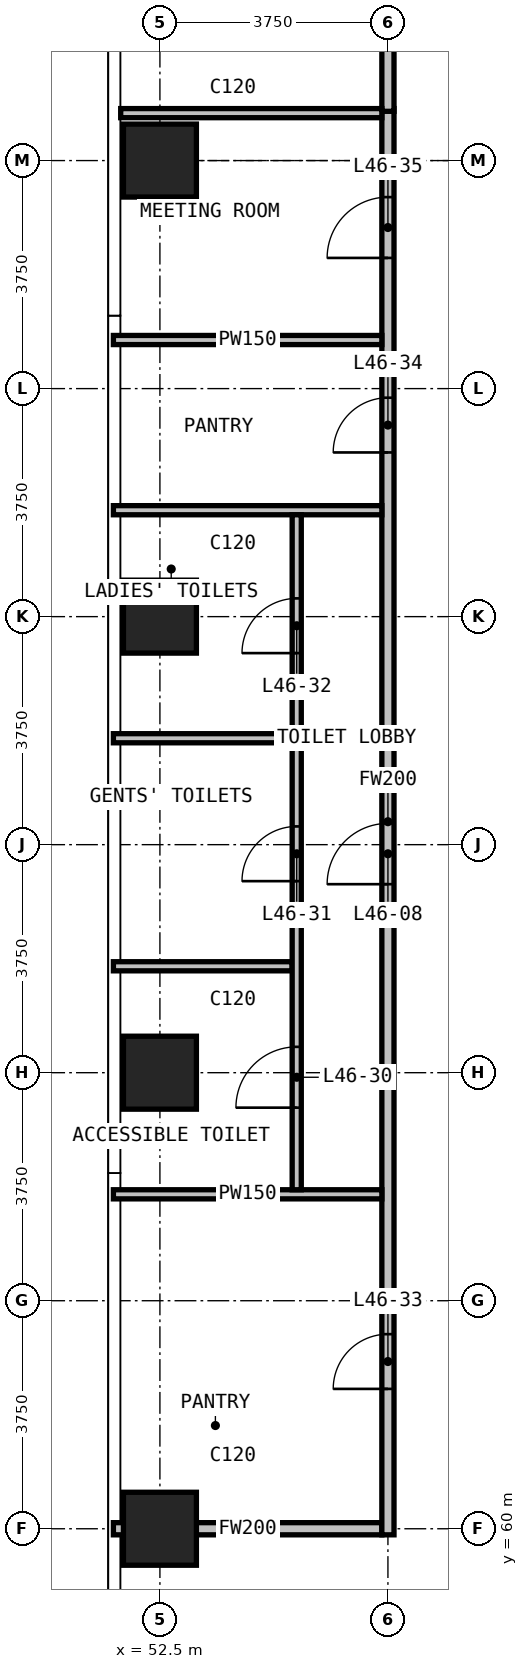
"""IFC4 building model, lengths in metres.
Left out: names, types, materials, properties, quantities, classifications, styles, units other than length and angle.
Written with IfcOpenShell. Run it as: python <this file> out.ifc"""

import sys

from ifc_helpers import new_model, si_unit, direction, frame, frame_2d, origin, origin_2d, place, context, subcontext, project, spatial, rectangle, extrude, element, fill, save


model = new_model("IFC4")
c1 = context("Model", 3, precision=1e-05, world=origin(), true_north=direction((0.0, 1.0)))
c2 = subcontext(c1, "Body", "Model", "MODEL_VIEW")
j1 = project(units=[si_unit("LENGTHUNIT", "METRE"), si_unit("PLANEANGLEUNIT", "RADIAN")], contexts=[c1])
p1 = place(None, origin())
s1 = spatial("IfcSite", under=j1, at=p1, CompositionType="ELEMENT")
p2 = place(p1, origin())
s2 = spatial("IfcBuilding", under=s1, at=p2, CompositionType="ELEMENT")
p3 = place(p2, frame((0.0, 0.0, 180.1)))
s3 = spatial("IfcBuildingStorey", under=s2, at=p3, CompositionType="ELEMENT", Elevation=180.1)
for number, where, z_axis, x_axis in (
    (1, (52.5, 60.0, 0.0), (0.0, 0.0, 1.0), (1.0, 0.0, 0.0)),
    (2, (52.5, 67.5, 0.0), (0.0, 0.0, 1.0), (1.0, 0.0, 0.0)),
    (3, (52.5, 75.0, 0.0), (0.0, 0.0, 1.0), (1.0, 0.0, 0.0)),
    (4, (52.5, 82.5, 0.0), (0.0, 0.0, 1.0), (1.0, 0.0, 0.0)),
):
    element("IfcColumn", number, at=place(p3, frame(where, z_axis=z_axis, x_axis=x_axis)), inside=s3, PredefinedType="COLUMN", context=c2, shape_type="SweptSolid", body=[
        extrude(rectangle(XDim=1.2, YDim=1.2, at=origin_2d()), origin(), (0.0, 0.0, 1.0), 3.6),
    ])
p4 = place(p3, frame((51.735, 60.0, 0.0), z_axis=(0.0, 0.0, 1.0), x_axis=(1.0, 0.0, 0.0)))
e5 = element("IfcWall", 5, at=p4, inside=s3, PredefinedType="PARTITIONING", context=c2, shape_type="SweptSolid", body=[
    extrude(rectangle(XDim=4.415, YDim=0.2, at=frame_2d((2.208, 0.0))), origin(), (0.0, 0.0, 1.0), 3.25),
])
p5 = place(p3, frame((56.25, 59.9, 0.0), z_axis=(0.0, 0.0, 1.0), x_axis=(0.0, 1.0, 0.0)))
e6 = element("IfcWall", 6, at=p5, inside=s3, PredefinedType="PARTITIONING", context=c2, shape_type="SweptSolid", body=[
    extrude(rectangle(XDim=23.455, YDim=0.2, at=frame_2d((11.728, 0.0))), origin(), (0.0, 0.0, 1.0), 3.25),
])
p6 = place(p5, frame((10.7, 0.0, 0.0)))
e7 = element("IfcOpeningElement", 7, at=p6, cuts=e6, PredefinedType="OPENING", context=c2, shape_type="SweptSolid", body=[
    extrude(rectangle(XDim=1.0, YDim=2.2, at=frame_2d((0.5, 1.1))), frame((0.0, 0.11, 0.0), z_axis=(0.0, -1.0, 0.0), x_axis=(1.0, 0.0, 0.0)), (0.0, 0.0, 1.0), 0.22),
])
p7 = place(p5, frame((2.4, 0.0, 0.0)))
e8 = element("IfcOpeningElement", 8, at=p7, cuts=e6, PredefinedType="OPENING", context=c2, shape_type="SweptSolid", body=[
    extrude(rectangle(XDim=0.9, YDim=2.2, at=frame_2d((0.45, 1.1))), frame((0.0, 0.11, 0.0), z_axis=(0.0, -1.0, 0.0), x_axis=(1.0, 0.0, 0.0)), (0.0, 0.0, 1.0), 0.22),
])
p8 = place(p5, frame((17.8, 0.0, 0.0)))
e9 = element("IfcOpeningElement", 9, at=p8, cuts=e6, PredefinedType="OPENING", context=c2, shape_type="SweptSolid", body=[
    extrude(rectangle(XDim=0.9, YDim=2.2, at=frame_2d((0.45, 1.1))), frame((0.0, 0.11, 0.0), z_axis=(0.0, -1.0, 0.0), x_axis=(1.0, 0.0, 0.0)), (0.0, 0.0, 1.0), 0.22),
])
p9 = place(p5, frame((20.999, 0.0, 0.0)))
e10 = element("IfcOpeningElement", 10, at=p9, cuts=e6, PredefinedType="OPENING", context=c2, shape_type="SweptSolid", body=[
    extrude(rectangle(XDim=1.0, YDim=2.2, at=frame_2d((0.5, 1.1))), frame((0.0, 0.11, 0.0), z_axis=(0.0, -1.0, 0.0), x_axis=(1.0, 0.0, 0.0)), (0.0, 0.0, 1.0), 0.22),
])
p10 = place(p3, frame((56.25, 83.31, 0.0), z_axis=(0.0, 0.0, 1.0), x_axis=(0.0, 1.0, 0.0)))
e11 = element("IfcWall", 11, at=p10, inside=s3, PredefinedType="PARTITIONING", context=c2, shape_type="SweptSolid", body=[
    extrude(rectangle(XDim=7.335, YDim=0.2, at=frame_2d((3.667, 0.0))), origin(), (0.0, 0.0, 1.0), 3.25),
])
p11 = place(p3, frame((51.735, 65.5, 0.0), z_axis=(0.0, 0.0, 1.0), x_axis=(1.0, 0.0, 0.0)))
e12 = element("IfcWall", 12, at=p11, inside=s3, PredefinedType="PARTITIONING", context=c2, shape_type="SweptSolid", body=[
    extrude(rectangle(XDim=4.415, YDim=0.15, at=frame_2d((2.208, 0.0))), origin(), (0.0, 0.0, 1.0), 3.25),
])
for number, where, z_axis, x_axis in (
    (13, (51.735, 69.25, 0.0), (0.0, 0.0, 1.0), (1.0, 0.0, 0.0)),
    (14, (51.735, 73.0, 0.0), (0.0, 0.0, 1.0), (1.0, 0.0, 0.0)),
):
    element("IfcWall", number, at=place(p3, frame(where, z_axis=z_axis, x_axis=x_axis)), inside=s3, PredefinedType="PARTITIONING", context=c2, shape_type="SweptSolid", body=[
        extrude(rectangle(XDim=2.94, YDim=0.15, at=frame_2d((1.47, 0.0))), origin(), (0.0, 0.0, 1.0), 3.25),
    ])
for number, where, z_axis, x_axis in (
    (15, (51.735, 76.75, 0.0), (0.0, 0.0, 1.0), (1.0, 0.0, 0.0)),
    (16, (51.735, 79.549, 0.0), (0.0, 0.0, 1.0), (1.0, 0.0, 0.0)),
):
    element("IfcWall", number, at=place(p3, frame(where, z_axis=z_axis, x_axis=x_axis)), inside=s3, PredefinedType="PARTITIONING", context=c2, shape_type="SweptSolid", body=[
        extrude(rectangle(XDim=4.415, YDim=0.15, at=frame_2d((2.208, 0.0))), origin(), (0.0, 0.0, 1.0), 3.25),
    ])
p12 = place(p3, frame((51.855, 83.28, 0.0), z_axis=(0.0, 0.0, 1.0), x_axis=(1.0, 0.0, 0.0)))
e17 = element("IfcWall", 17, at=p12, inside=s3, PredefinedType="PARTITIONING", context=c2, shape_type="SweptSolid", body=[
    extrude(rectangle(XDim=4.295, YDim=0.15, at=frame_2d((2.147, 0.0))), origin(), (0.0, 0.0, 1.0), 3.25),
])
p13 = place(p3, frame((54.75, 65.575, 0.0), z_axis=(0.0, 0.0, 1.0), x_axis=(0.0, 1.0, 0.0)))
e18 = element("IfcWall", 18, at=p13, inside=s3, PredefinedType="PARTITIONING", context=c2, shape_type="SweptSolid", body=[
    extrude(rectangle(XDim=11.1, YDim=0.15, at=frame_2d((5.55, 0.0))), origin(), (0.0, 0.0, 1.0), 3.25),
])
p14 = place(p13, frame((1.35, 0.0, 0.0)))
e19 = element("IfcOpeningElement", 19, at=p14, cuts=e18, PredefinedType="OPENING", context=c2, shape_type="SweptSolid", body=[
    extrude(rectangle(XDim=1.0, YDim=2.2, at=frame_2d((0.5, 1.1))), frame((0.0, 0.085, 0.0), z_axis=(0.0, -1.0, 0.0), x_axis=(1.0, 0.0, 0.0)), (0.0, 0.0, 1.0), 0.17),
])
p15 = place(p13, frame((5.075, 0.0, 0.0)))
e20 = element("IfcOpeningElement", 20, at=p15, cuts=e18, PredefinedType="OPENING", context=c2, shape_type="SweptSolid", body=[
    extrude(rectangle(XDim=0.9, YDim=2.2, at=frame_2d((0.45, 1.1))), frame((0.0, 0.085, 0.0), z_axis=(0.0, -1.0, 0.0), x_axis=(1.0, 0.0, 0.0)), (0.0, 0.0, 1.0), 0.17),
])
p16 = place(p13, frame((8.825, 0.0, 0.0)))
e21 = element("IfcOpeningElement", 21, at=p16, cuts=e18, PredefinedType="OPENING", context=c2, shape_type="SweptSolid", body=[
    extrude(rectangle(XDim=0.9, YDim=2.2, at=frame_2d((0.45, 1.1))), frame((0.0, 0.085, 0.0), z_axis=(0.0, -1.0, 0.0), x_axis=(1.0, 0.0, 0.0)), (0.0, 0.0, 1.0), 0.17),
])
p17 = place(p6, origin())
e22 = element("IfcDoor", 22, at=p17, inside=s3, OperationType="SINGLE_SWING_RIGHT", PredefinedType="DOOR", context=c2, shape_type="SweptSolid", body=[
    extrude(rectangle(XDim=1.0, YDim=2.2, at=frame_2d((0.5, 1.1))), frame((0.0, 0.025, 0.0), z_axis=(0.0, -1.0, 0.0), x_axis=(1.0, 0.0, 0.0)), (0.0, 0.0, 1.0), 0.05),
])
fill(e7, e22)
p18 = place(p14, origin())
e23 = element("IfcDoor", 23, at=p18, inside=s3, OperationType="SINGLE_SWING_LEFT", PredefinedType="DOOR", context=c2, shape_type="SweptSolid", body=[
    extrude(rectangle(XDim=1.0, YDim=2.2, at=frame_2d((0.5, 1.1))), frame((0.0, 0.025, 0.0), z_axis=(0.0, -1.0, 0.0), x_axis=(1.0, 0.0, 0.0)), (0.0, 0.0, 1.0), 0.05),
])
fill(e19, e23)
p19 = place(p15, origin())
e24 = element("IfcDoor", 24, at=p19, inside=s3, OperationType="SINGLE_SWING_RIGHT", PredefinedType="DOOR", context=c2, shape_type="SweptSolid", body=[
    extrude(rectangle(XDim=0.9, YDim=2.2, at=frame_2d((0.45, 1.1))), frame((0.0, 0.025, 0.0), z_axis=(0.0, -1.0, 0.0), x_axis=(1.0, 0.0, 0.0)), (0.0, 0.0, 1.0), 0.05),
])
fill(e20, e24)
p20 = place(p16, origin())
e25 = element("IfcDoor", 25, at=p20, inside=s3, OperationType="SINGLE_SWING_LEFT", PredefinedType="DOOR", context=c2, shape_type="SweptSolid", body=[
    extrude(rectangle(XDim=0.9, YDim=2.2, at=frame_2d((0.45, 1.1))), frame((0.0, 0.025, 0.0), z_axis=(0.0, -1.0, 0.0), x_axis=(1.0, 0.0, 0.0)), (0.0, 0.0, 1.0), 0.05),
])
fill(e21, e25)
p21 = place(p7, origin())
e26 = element("IfcDoor", 26, at=p21, inside=s3, OperationType="SINGLE_SWING_LEFT", PredefinedType="DOOR", context=c2, shape_type="SweptSolid", body=[
    extrude(rectangle(XDim=0.9, YDim=2.2, at=frame_2d((0.45, 1.1))), frame((0.0, 0.025, 0.0), z_axis=(0.0, -1.0, 0.0), x_axis=(1.0, 0.0, 0.0)), (0.0, 0.0, 1.0), 0.05),
])
fill(e8, e26)
p22 = place(p8, origin())
e27 = element("IfcDoor", 27, at=p22, inside=s3, OperationType="SINGLE_SWING_RIGHT", PredefinedType="DOOR", context=c2, shape_type="SweptSolid", body=[
    extrude(rectangle(XDim=0.9, YDim=2.2, at=frame_2d((0.45, 1.1))), frame((0.0, 0.025, 0.0), z_axis=(0.0, -1.0, 0.0), x_axis=(1.0, 0.0, 0.0)), (0.0, 0.0, 1.0), 0.05),
])
fill(e9, e27)
p23 = place(p9, origin())
e28 = element("IfcDoor", 28, at=p23, inside=s3, OperationType="SINGLE_SWING_RIGHT", PredefinedType="DOOR", context=c2, shape_type="SweptSolid", body=[
    extrude(rectangle(XDim=1.0, YDim=2.2, at=frame_2d((0.5, 1.1))), frame((0.0, 0.025, 0.0), z_axis=(0.0, -1.0, 0.0), x_axis=(1.0, 0.0, 0.0)), (0.0, 0.0, 1.0), 0.05),
])
fill(e10, e28)
save(model, sys.argv[1])
